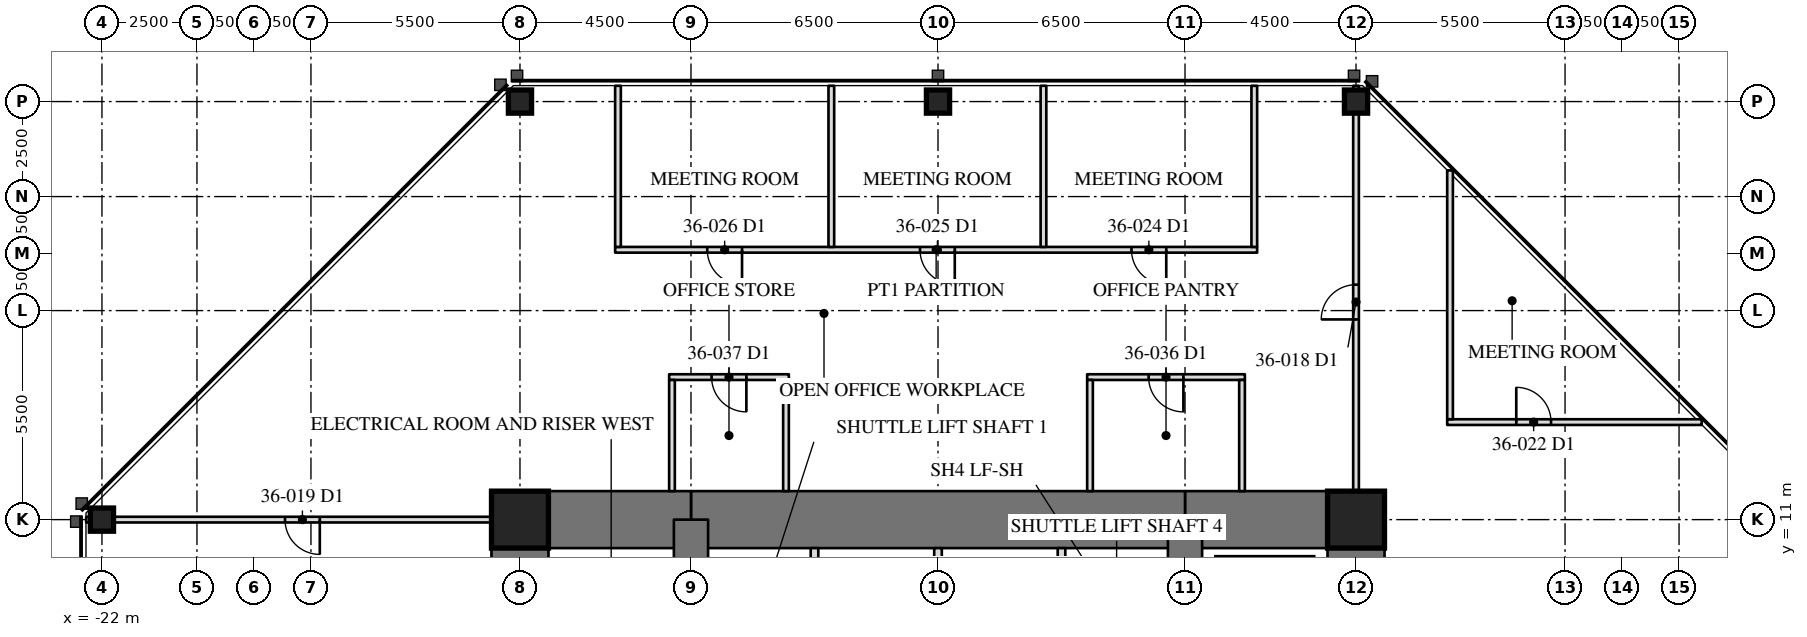
"""IFC4 building model, lengths in metres.
Left out: names, types, materials, properties, quantities, classifications, styles, units other than length and angle.
Written with IfcOpenShell. Run it as: python <this file> out.ifc"""

import sys

from ifc_helpers import new_model, si_unit, direction, frame, frame_2d, origin, origin_2d, place, context, subcontext, project, spatial, rectangle, hollow_rectangle, extrude, element, fill, save


model = new_model("IFC4")
c1 = context("Model", 3, precision=1e-05, world=origin(), true_north=direction((0.0, 1.0)))
c2 = subcontext(c1, "Body", "Model", "MODEL_VIEW")
j1 = project(units=[si_unit("LENGTHUNIT", "METRE"), si_unit("PLANEANGLEUNIT", "RADIAN")], contexts=[c1])
p1 = place(None, origin())
s1 = spatial("IfcSite", under=j1, at=p1, CompositionType="ELEMENT")
p2 = place(p1, origin())
s2 = spatial("IfcBuilding", under=s1, at=p2, CompositionType="ELEMENT")
p3 = place(p2, frame((0.0, 0.0, 154.1)))
s3 = spatial("IfcBuildingStorey", under=s2, at=p3, CompositionType="ELEMENT", Elevation=154.1)
for number, where, z_axis, x_axis in (
    (1, (11.0, 22.0, 0.0), (0.0, 0.0, 1.0), (1.0, 0.0, 0.0)),
    (2, (0.0, 22.0, 0.0), (0.0, 0.0, 1.0), (1.0, 0.0, 0.0)),
    (3, (-11.0, 22.0, 0.0), (0.0, 0.0, 1.0), (1.0, 0.0, 0.0)),
    (4, (-22.0, 11.0, 0.0), (0.0, 0.0, 1.0), (0.0, 1.0, 0.0)),
):
    element("IfcColumn", number, at=place(p3, frame(where, z_axis=z_axis, x_axis=x_axis)), inside=s3, PredefinedType="COLUMN", context=c2, shape_type="SweptSolid", body=[
        extrude(hollow_rectangle(XDim=0.61, YDim=0.61, WallThickness=0.076, at=origin_2d()), origin(), (0.0, 0.0, 1.0), 4.1),
    ])
p4 = place(p3, frame((11.0, -11.0, 0.0), z_axis=(0.0, 0.0, 1.0), x_axis=(0.0, 1.0, 0.0)))
e5 = element("IfcWall", 5, at=p4, inside=s3, PredefinedType="SHEAR", context=c2, shape_type="SweptSolid", body=[
    extrude(rectangle(XDim=22.0, YDim=1.5, at=frame_2d((11.0, 0.0))), origin(), (0.0, 0.0, 1.0), 4.1),
])
p5 = place(p4, frame((15.393, 0.0, 0.0)))
e6 = element("IfcOpeningElement", 6, at=p5, cuts=e5, PredefinedType="OPENING", context=c2, shape_type="SweptSolid", body=[
    extrude(rectangle(XDim=0.915, YDim=2.134, at=frame_2d((0.458, 1.067))), frame((0.0, 0.76, 0.0), z_axis=(0.0, -1.0, 0.0), x_axis=(1.0, 0.0, 0.0)), (0.0, 0.0, 1.0), 1.52),
])
p6 = place(p3, frame((-11.0, 11.0, 0.0), z_axis=(0.0, 0.0, 1.0), x_axis=(0.0, -1.0, 0.0)))
e7 = element("IfcWall", 7, at=p6, inside=s3, PredefinedType="SHEAR", context=c2, shape_type="SweptSolid", body=[
    extrude(rectangle(XDim=22.0, YDim=1.5, at=frame_2d((11.0, 0.0))), origin(), (0.0, 0.0, 1.0), 4.1),
])
p7 = place(p6, frame((15.393, 0.0, 0.0)))
e8 = element("IfcOpeningElement", 8, at=p7, cuts=e7, PredefinedType="OPENING", context=c2, shape_type="SweptSolid", body=[
    extrude(rectangle(XDim=0.915, YDim=2.134, at=frame_2d((0.458, 1.067))), frame((0.0, 0.76, 0.0), z_axis=(0.0, -1.0, 0.0), x_axis=(1.0, 0.0, 0.0)), (0.0, 0.0, 1.0), 1.52),
])
p8 = place(p3, frame((11.0, 11.0, 0.0), z_axis=(0.0, 0.0, 1.0), x_axis=(-1.0, 0.0, 0.0)))
e9 = element("IfcWall", 9, at=p8, inside=s3, PredefinedType="SHEAR", context=c2, shape_type="SweptSolid", body=[
    extrude(rectangle(XDim=4.5, YDim=1.5, at=frame_2d((2.25, 0.0))), origin(), (0.0, 0.0, 1.0), 4.1),
])
p9 = place(p3, frame((6.5, 11.0, 0.0), z_axis=(0.0, 0.0, 1.0), x_axis=(-1.0, 0.0, 0.0)))
e10 = element("IfcWall", 10, at=p9, inside=s3, PredefinedType="SHEAR", context=c2, shape_type="SweptSolid", body=[
    extrude(rectangle(XDim=13.0, YDim=1.5, at=frame_2d((6.5, 0.0))), origin(), (0.0, 0.0, 1.0), 4.1),
])
p10 = place(p3, frame((-6.5, 11.0, 0.0), z_axis=(0.0, 0.0, 1.0), x_axis=(-1.0, 0.0, 0.0)))
e11 = element("IfcWall", 11, at=p10, inside=s3, PredefinedType="SHEAR", context=c2, shape_type="SweptSolid", body=[
    extrude(rectangle(XDim=4.5, YDim=1.5, at=frame_2d((2.25, 0.0))), origin(), (0.0, 0.0, 1.0), 4.1),
])
for number, where, z_axis, x_axis in (
    (12, (6.5, 6.5, 0.0), (0.0, 0.0, 1.0), (0.0, 1.0, 0.0)),
    (13, (-6.5, 11.0, 0.0), (0.0, 0.0, 1.0), (0.0, -1.0, 0.0)),
):
    element("IfcWall", number, at=place(p3, frame(where, z_axis=z_axis, x_axis=x_axis)), inside=s3, PredefinedType="SHEAR", context=c2, shape_type="SweptSolid", body=[
        extrude(rectangle(XDim=4.5, YDim=0.9, at=frame_2d((2.25, 0.0))), origin(), (0.0, 0.0, 1.0), 4.1),
    ])
for number, where, z_axis, x_axis in (
    (14, (11.0, 11.0, 0.0), (0.0, 0.0, 1.0), (1.0, 0.0, 0.0)),
    (15, (-11.0, 11.0, 0.0), (0.0, 0.0, 1.0), (1.0, 0.0, 0.0)),
):
    element("IfcColumn", number, at=place(p3, frame(where, z_axis=z_axis, x_axis=x_axis)), inside=s3, PredefinedType="COLUMN", context=c2, shape_type="SweptSolid", body=[
        extrude(hollow_rectangle(XDim=1.499, YDim=1.499, WallThickness=0.102, at=origin_2d()), origin(), (0.0, 0.0, 1.0), 4.1),
    ])
for number, where, z_axis, x_axis in (
    (16, (-3.25, 6.95, 0.0), (0.0, 0.0, 1.0), (0.0, 1.0, 0.0)),
    (17, (0.0, 6.95, 0.0), (0.0, 0.0, 1.0), (0.0, 1.0, 0.0)),
    (18, (3.25, 6.95, 0.0), (0.0, 0.0, 1.0), (0.0, 1.0, 0.0)),
):
    element("IfcWall", number, at=place(p3, frame(where, z_axis=z_axis, x_axis=x_axis)), inside=s3, PredefinedType="PARTITIONING", context=c2, shape_type="SweptSolid", body=[
        extrude(rectangle(XDim=3.3, YDim=0.2, at=frame_2d((1.65, 0.0))), origin(), (0.0, 0.0, 1.0), 3.91),
    ])
p11 = place(p3, frame((11.0, 11.75, 0.0), z_axis=(0.0, 0.0, 1.0), x_axis=(0.0, 1.0, 0.0)))
e19 = element("IfcWall", 19, at=p11, inside=s3, PredefinedType="PARTITIONING", context=c2, shape_type="SweptSolid", body=[
    extrude(rectangle(XDim=10.665, YDim=0.15, at=frame_2d((5.333, 0.0))), origin(), (0.0, 0.0, 1.0), 3.326),
])
p12 = place(p11, frame((4.518, 0.0, 0.0)))
e20 = element("IfcOpeningElement", 20, at=p12, cuts=e19, PredefinedType="OPENING", context=c2, shape_type="SweptSolid", body=[
    extrude(rectangle(XDim=0.915, YDim=2.134, at=frame_2d((0.458, 1.067))), frame((0.0, 0.085, 0.0), z_axis=(0.0, -1.0, 0.0), x_axis=(1.0, 0.0, 0.0)), (0.0, 0.0, 1.0), 0.17),
])
p13 = place(p3, frame((-11.75, 11.0, 0.0), z_axis=(0.0, 0.0, 1.0), x_axis=(-1.0, 0.0, 0.0)))
e21 = element("IfcWall", 21, at=p13, inside=s3, PredefinedType="PARTITIONING", context=c2, shape_type="SweptSolid", body=[
    extrude(rectangle(XDim=10.665, YDim=0.15, at=frame_2d((5.333, 0.0))), origin(), (0.0, 0.0, 1.0), 3.326),
])
p14 = place(p13, frame((4.518, 0.0, 0.0)))
e22 = element("IfcOpeningElement", 22, at=p14, cuts=e21, PredefinedType="OPENING", context=c2, shape_type="SweptSolid", body=[
    extrude(rectangle(XDim=0.915, YDim=2.134, at=frame_2d((0.458, 1.067))), frame((0.0, 0.085, 0.0), z_axis=(0.0, -1.0, 0.0), x_axis=(1.0, 0.0, 0.0)), (0.0, 0.0, 1.0), 0.17),
])
p15 = place(p3, frame((13.399, 13.566, 0.0), z_axis=(0.0, 0.0, 1.0), x_axis=(1.0, 0.0, 0.0)))
e23 = element("IfcWall", 23, at=p15, inside=s3, PredefinedType="PARTITIONING", context=c2, shape_type="SweptSolid", body=[
    extrude(rectangle(XDim=6.698, YDim=0.15, at=frame_2d((3.349, 0.0))), origin(), (0.0, 0.0, 1.0), 3.91),
])
p16 = place(p15, frame((1.817, 0.0, 0.0)))
e24 = element("IfcOpeningElement", 24, at=p16, cuts=e23, PredefinedType="OPENING", context=c2, shape_type="SweptSolid", body=[
    extrude(rectangle(XDim=0.915, YDim=2.134, at=frame_2d((0.458, 1.067))), frame((0.0, 0.085, 0.0), z_axis=(0.0, -1.0, 0.0), x_axis=(1.0, 0.0, 0.0)), (0.0, 0.0, 1.0), 0.17),
])
p17 = place(p3, frame((13.474, 13.641, 0.0), z_axis=(0.0, 0.0, 1.0), x_axis=(0.0, 1.0, 0.0)))
e25 = element("IfcWall", 25, at=p17, inside=s3, PredefinedType="PARTITIONING", context=c2, shape_type="SweptSolid", body=[
    extrude(rectangle(XDim=6.548, YDim=0.15, at=frame_2d((3.274, 0.0))), origin(), (0.0, 0.0, 1.0), 3.91),
])
p18 = place(p3, frame((8.398, 18.1, 0.0), z_axis=(0.0, 0.0, 1.0), x_axis=(-1.0, 0.0, 0.0)))
e26 = element("IfcWall", 26, at=p18, inside=s3, PredefinedType="PARTITIONING", context=c2, shape_type="SweptSolid", body=[
    extrude(rectangle(XDim=16.894, YDim=0.15, at=frame_2d((8.447, 0.0))), origin(), (0.0, 0.0, 1.0), 3.91),
])
p19 = place(p18, frame((2.392, 0.0, 0.0)))
e27 = element("IfcOpeningElement", 27, at=p19, cuts=e26, PredefinedType="OPENING", context=c2, shape_type="SweptSolid", body=[
    extrude(rectangle(XDim=0.915, YDim=2.134, at=frame_2d((0.458, 1.067))), frame((0.0, 0.085, 0.0), z_axis=(0.0, -1.0, 0.0), x_axis=(1.0, 0.0, 0.0)), (0.0, 0.0, 1.0), 0.17),
])
p20 = place(p18, frame((7.957, 0.0, 0.0)))
e28 = element("IfcOpeningElement", 28, at=p20, cuts=e26, PredefinedType="OPENING", context=c2, shape_type="SweptSolid", body=[
    extrude(rectangle(XDim=0.915, YDim=2.134, at=frame_2d((0.458, 1.067))), frame((0.0, 0.085, 0.0), z_axis=(0.0, -1.0, 0.0), x_axis=(1.0, 0.0, 0.0)), (0.0, 0.0, 1.0), 0.17),
])
p21 = place(p18, frame((13.554, 0.0, 0.0)))
e29 = element("IfcOpeningElement", 29, at=p21, cuts=e26, PredefinedType="OPENING", context=c2, shape_type="SweptSolid", body=[
    extrude(rectangle(XDim=0.915, YDim=2.134, at=frame_2d((0.458, 1.067))), frame((0.0, 0.085, 0.0), z_axis=(0.0, -1.0, 0.0), x_axis=(1.0, 0.0, 0.0)), (0.0, 0.0, 1.0), 0.17),
])
for number, where, z_axis, x_axis in (
    (30, (8.323, 18.175, 0.0), (0.0, 0.0, 1.0), (0.0, 1.0, 0.0)),
    (31, (2.775, 18.175, 0.0), (0.0, 0.0, 1.0), (0.0, 1.0, 0.0)),
    (32, (-2.807, 18.175, 0.0), (0.0, 0.0, 1.0), (0.0, 1.0, 0.0)),
    (33, (-8.421, 18.175, 0.0), (0.0, 0.0, 1.0), (0.0, 1.0, 0.0)),
):
    element("IfcWall", number, at=place(p3, frame(where, z_axis=z_axis, x_axis=x_axis)), inside=s3, PredefinedType="PARTITIONING", context=c2, shape_type="SweptSolid", body=[
        extrude(rectangle(XDim=4.24, YDim=0.15, at=frame_2d((2.12, 0.0))), origin(), (0.0, 0.0, 1.0), 3.91),
    ])
p22 = place(p3, frame((8.075, 14.75, 0.0), z_axis=(0.0, 0.0, 1.0), x_axis=(-1.0, 0.0, 0.0)))
e34 = element("IfcWall", 34, at=p22, inside=s3, PredefinedType="PARTITIONING", context=c2, shape_type="SweptSolid", body=[
    extrude(rectangle(XDim=4.15, YDim=0.15, at=frame_2d((2.075, 0.0))), origin(), (0.0, 0.0, 1.0), 3.91),
])
p23 = place(p22, frame((1.617, 0.0, 0.0)))
e35 = element("IfcOpeningElement", 35, at=p23, cuts=e34, PredefinedType="OPENING", context=c2, shape_type="SweptSolid", body=[
    extrude(rectangle(XDim=0.915, YDim=2.134, at=frame_2d((0.458, 1.067))), frame((0.0, 0.085, 0.0), z_axis=(0.0, -1.0, 0.0), x_axis=(1.0, 0.0, 0.0)), (0.0, 0.0, 1.0), 0.17),
])
for number, where, z_axis, x_axis in (
    (36, (8.0, 14.675, 0.0), (0.0, 0.0, 1.0), (0.0, -1.0, 0.0)),
    (37, (4.0, 14.675, 0.0), (0.0, 0.0, 1.0), (0.0, -1.0, 0.0)),
):
    element("IfcWall", number, at=place(p3, frame(where, z_axis=z_axis, x_axis=x_axis)), inside=s3, PredefinedType="PARTITIONING", context=c2, shape_type="SweptSolid", body=[
        extrude(rectangle(XDim=2.925, YDim=0.15, at=frame_2d((1.462, 0.0))), origin(), (0.0, 0.0, 1.0), 3.91),
    ])
p24 = place(p3, frame((-3.925, 14.75, 0.0), z_axis=(0.0, 0.0, 1.0), x_axis=(-1.0, 0.0, 0.0)))
e38 = element("IfcWall", 38, at=p24, inside=s3, PredefinedType="PARTITIONING", context=c2, shape_type="SweptSolid", body=[
    extrude(rectangle(XDim=3.15, YDim=0.15, at=frame_2d((1.575, 0.0))), origin(), (0.0, 0.0, 1.0), 3.91),
])
p25 = place(p24, frame((1.117, 0.0, 0.0)))
e39 = element("IfcOpeningElement", 39, at=p25, cuts=e38, PredefinedType="OPENING", context=c2, shape_type="SweptSolid", body=[
    extrude(rectangle(XDim=0.915, YDim=2.134, at=frame_2d((0.458, 1.067))), frame((0.0, 0.085, 0.0), z_axis=(0.0, -1.0, 0.0), x_axis=(1.0, 0.0, 0.0)), (0.0, 0.0, 1.0), 0.17),
])
for number, where, z_axis, x_axis in (
    (40, (-4.0, 14.675, 0.0), (0.0, 0.0, 1.0), (0.0, -1.0, 0.0)),
    (41, (-7.0, 14.675, 0.0), (0.0, 0.0, 1.0), (0.0, -1.0, 0.0)),
):
    element("IfcWall", number, at=place(p3, frame(where, z_axis=z_axis, x_axis=x_axis)), inside=s3, PredefinedType="PARTITIONING", context=c2, shape_type="SweptSolid", body=[
        extrude(rectangle(XDim=2.925, YDim=0.15, at=frame_2d((1.462, 0.0))), origin(), (0.0, 0.0, 1.0), 3.91),
    ])
p26 = place(p12, origin())
e42 = element("IfcDoor", 42, at=p26, inside=s3, OperationType="SINGLE_SWING_LEFT", PredefinedType="DOOR", context=c2, shape_type="SweptSolid", body=[
    extrude(rectangle(XDim=0.915, YDim=2.134, at=frame_2d((0.458, 1.067))), frame((0.0, 0.025, 0.0), z_axis=(0.0, -1.0, 0.0), x_axis=(1.0, 0.0, 0.0)), (0.0, 0.0, 1.0), 0.05),
])
fill(e20, e42)
p27 = place(p14, origin())
e43 = element("IfcDoor", 43, at=p27, inside=s3, OperationType="SINGLE_SWING_LEFT", PredefinedType="DOOR", context=c2, shape_type="SweptSolid", body=[
    extrude(rectangle(XDim=0.915, YDim=2.134, at=frame_2d((0.458, 1.067))), frame((0.0, 0.025, 0.0), z_axis=(0.0, -1.0, 0.0), x_axis=(1.0, 0.0, 0.0)), (0.0, 0.0, 1.0), 0.05),
])
fill(e22, e43)
p28 = place(p16, origin())
e44 = element("IfcDoor", 44, at=p28, inside=s3, OperationType="SINGLE_SWING_LEFT", PredefinedType="DOOR", context=c2, shape_type="SweptSolid", body=[
    extrude(rectangle(XDim=0.915, YDim=2.134, at=frame_2d((0.458, 1.067))), frame((0.0, 0.025, 0.0), z_axis=(0.0, -1.0, 0.0), x_axis=(1.0, 0.0, 0.0)), (0.0, 0.0, 1.0), 0.05),
])
fill(e24, e44)
p29 = place(p19, origin())
e45 = element("IfcDoor", 45, at=p29, inside=s3, OperationType="SINGLE_SWING_LEFT", PredefinedType="DOOR", context=c2, shape_type="SweptSolid", body=[
    extrude(rectangle(XDim=0.915, YDim=2.134, at=frame_2d((0.458, 1.067))), frame((0.0, 0.025, 0.0), z_axis=(0.0, -1.0, 0.0), x_axis=(1.0, 0.0, 0.0)), (0.0, 0.0, 1.0), 0.05),
])
fill(e27, e45)
p30 = place(p20, origin())
e46 = element("IfcDoor", 46, at=p30, inside=s3, OperationType="SINGLE_SWING_LEFT", PredefinedType="DOOR", context=c2, shape_type="SweptSolid", body=[
    extrude(rectangle(XDim=0.915, YDim=2.134, at=frame_2d((0.458, 1.067))), frame((0.0, 0.025, 0.0), z_axis=(0.0, -1.0, 0.0), x_axis=(1.0, 0.0, 0.0)), (0.0, 0.0, 1.0), 0.05),
])
fill(e28, e46)
p31 = place(p21, origin())
e47 = element("IfcDoor", 47, at=p31, inside=s3, OperationType="SINGLE_SWING_LEFT", PredefinedType="DOOR", context=c2, shape_type="SweptSolid", body=[
    extrude(rectangle(XDim=0.915, YDim=2.134, at=frame_2d((0.458, 1.067))), frame((0.0, 0.025, 0.0), z_axis=(0.0, -1.0, 0.0), x_axis=(1.0, 0.0, 0.0)), (0.0, 0.0, 1.0), 0.05),
])
fill(e29, e47)
p32 = place(p23, origin())
e48 = element("IfcDoor", 48, at=p32, inside=s3, OperationType="SINGLE_SWING_LEFT", PredefinedType="DOOR", context=c2, shape_type="SweptSolid", body=[
    extrude(rectangle(XDim=0.915, YDim=2.134, at=frame_2d((0.458, 1.067))), frame((0.0, 0.025, 0.0), z_axis=(0.0, -1.0, 0.0), x_axis=(1.0, 0.0, 0.0)), (0.0, 0.0, 1.0), 0.05),
])
fill(e35, e48)
p33 = place(p25, origin())
e49 = element("IfcDoor", 49, at=p33, inside=s3, OperationType="SINGLE_SWING_LEFT", PredefinedType="DOOR", context=c2, shape_type="SweptSolid", body=[
    extrude(rectangle(XDim=0.915, YDim=2.134, at=frame_2d((0.458, 1.067))), frame((0.0, 0.025, 0.0), z_axis=(0.0, -1.0, 0.0), x_axis=(1.0, 0.0, 0.0)), (0.0, 0.0, 1.0), 0.05),
])
fill(e39, e49)
save(model, sys.argv[1])
